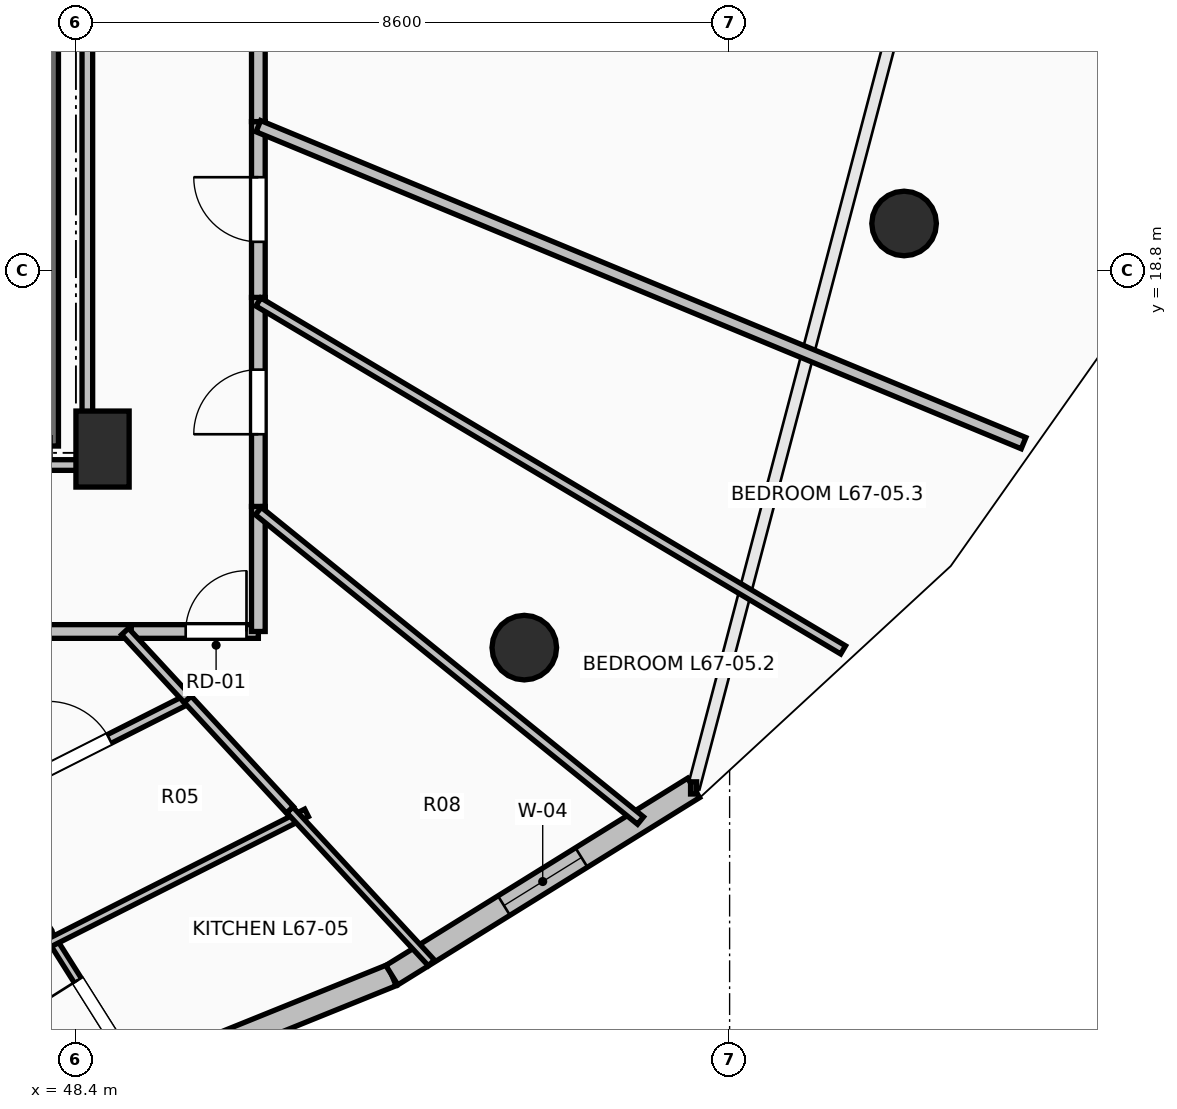
"""IFC4 building model, lengths in metres.
Left out: names, types, materials, properties, quantities, classifications, styles, units other than length and angle.
Written with IfcOpenShell. Run it as: python <this file> out.ifc"""

import sys

from ifc_helpers import new_model, si_unit, direction, frame, frame_2d, origin, origin_2d, place, context, subcontext, project, spatial, rectangle, circle, extrude, element, fill, save


model = new_model("IFC4")
c1 = context("Model", 3, precision=1e-05, world=origin(), true_north=direction((0.0, 1.0)))
c2 = subcontext(c1, "Body", "Model", "MODEL_VIEW")
j1 = project(units=[si_unit("LENGTHUNIT", "METRE"), si_unit("PLANEANGLEUNIT", "RADIAN")], contexts=[c1])
p1 = place(None, origin())
s1 = spatial("IfcSite", under=j1, at=p1, CompositionType="ELEMENT")
p2 = place(p1, origin())
s2 = spatial("IfcBuilding", under=s1, at=p2, CompositionType="ELEMENT")
p3 = place(p2, frame((0.0, 0.0, 248.45)))
s3 = spatial("IfcBuildingStorey", under=s2, at=p3, CompositionType="ELEMENT", Elevation=248.45)
for number, where, z_axis, x_axis in (
    (1, (54.299, 13.838, 0.0), (0.0, 0.0, 1.0), (0.707, -0.707, 0.0)),
    (2, (59.295, 19.418, 0.0), (0.0, 0.0, 1.0), (0.924, -0.383, 0.0)),
):
    element("IfcColumn", number, at=place(p3, frame(where, z_axis=z_axis, x_axis=x_axis)), inside=s3, PredefinedType="COLUMN", context=c2, shape_type="SweptSolid", body=[
        extrude(circle(Radius=0.425, at=origin_2d()), origin(), (0.0, 0.0, 1.0), 3.55),
    ])
p4 = place(p3, frame((48.75, 16.45, 0.0), z_axis=(0.0, 0.0, 1.0), x_axis=(1.0, 0.0, 0.0)))
e3 = element("IfcColumn", 3, at=p4, inside=s3, PredefinedType="PILASTER", context=c2, shape_type="SweptSolid", body=[
    extrude(rectangle(XDim=0.7, YDim=1.0, at=origin_2d()), origin(), (0.0, 0.0, 1.0), 3.55),
])
p5 = place(p3, frame((48.026, 7.698, 0.0), z_axis=(0.0, 0.0, 1.0), x_axis=(0.927147375511, 0.374696869594, 0.0)))
e4 = element("IfcWall", 4, at=p5, inside=s3, PredefinedType="STANDARD", context=c2, shape_type="SweptSolid", body=[
    extrude(rectangle(XDim=4.885, YDim=0.3, at=frame_2d((2.443, 0.0))), origin(), (0.0, 0.0, 1.0), 3.29),
])
p6 = place(p3, frame((52.556, 9.529, 0.0), z_axis=(0.0, 0.0, 1.0), x_axis=(0.849702323036, 0.527262707032, 0.0)))
e5 = element("IfcWall", 5, at=p6, inside=s3, PredefinedType="STANDARD", context=c2, shape_type="SweptSolid", body=[
    extrude(rectangle(XDim=4.672, YDim=0.3, at=frame_2d((2.336, 0.0))), origin(), (0.0, 0.0, 1.0), 3.29),
])
p7 = place(p6, frame((1.736, 0.0, 0.85)))
e6 = element("IfcOpeningElement", 6, at=p7, cuts=e5, PredefinedType="OPENING", context=c2, shape_type="SweptSolid", body=[
    extrude(rectangle(XDim=1.2, YDim=1.95, at=frame_2d((0.6, 0.975))), frame((0.0, 0.165, 0.0), z_axis=(0.0, -1.0, 0.0), x_axis=(1.0, 0.0, 0.0)), (0.0, 0.0, 1.0), 0.33),
])
p8 = place(p3, frame((48.06, 23.91, 0.0), z_axis=(0.0, 0.0, 1.0), x_axis=(0.0, -1.0, 0.0)))
e7 = element("IfcWall", 7, at=p8, inside=s3, PredefinedType="SOLIDWALL", context=c2, shape_type="SweptSolid", body=[
    extrude(rectangle(XDim=7.42, YDim=0.22, at=frame_2d((3.71, 0.0))), origin(), (0.0, 0.0, 1.0), 3.29),
])
p9 = place(p3, frame((45.237, 14.05, 0.0), z_axis=(0.0, 0.0, 1.0), x_axis=(1.0, 0.0, 0.0)))
e8 = element("IfcWall", 8, at=p9, inside=s3, PredefinedType="PARTITIONING", context=c2, shape_type="SweptSolid", body=[
    extrude(rectangle(XDim=3.891, YDim=0.18, at=frame_2d((1.945, 0.0))), origin(), (0.0, 0.0, 1.0), 2.482),
])
p10 = place(p9, frame((1.446, 0.0, 0.0)))
e9 = element("IfcOpeningElement", 9, at=p10, cuts=e8, PredefinedType="OPENING", context=c2, shape_type="SweptSolid", body=[
    extrude(rectangle(XDim=1.0, YDim=2.15, at=frame_2d((0.5, 1.075))), frame((0.0, 0.105, 0.0), z_axis=(0.0, -1.0, 0.0), x_axis=(1.0, 0.0, 0.0)), (0.0, 0.0, 1.0), 0.21),
])
p11 = place(p3, frame((49.128, 14.05, 0.0), z_axis=(0.0, 0.0, 1.0), x_axis=(1.0, 0.0, 0.0)))
e10 = element("IfcWall", 10, at=p11, inside=s3, PredefinedType="PARTITIONING", context=c2, shape_type="SweptSolid", body=[
    extrude(rectangle(XDim=1.672, YDim=0.18, at=frame_2d((0.836, 0.0))), origin(), (0.0, 0.0, 1.0), 2.972),
])
p12 = place(p11, frame((0.716, 0.0, 0.0)))
e11 = element("IfcOpeningElement", 11, at=p12, cuts=e10, PredefinedType="OPENING", context=c2, shape_type="SweptSolid", body=[
    extrude(rectangle(XDim=0.8, YDim=2.05, at=frame_2d((0.4, 1.025))), frame((0.0, 0.105, 0.0), z_axis=(0.0, -1.0, 0.0), x_axis=(1.0, 0.0, 0.0)), (0.0, 0.0, 1.0), 0.21),
])
p13 = place(p3, frame((50.8, 14.05, 0.0), z_axis=(0.0, 0.0, 1.0), x_axis=(0.0, 1.0, 0.0)))
e12 = element("IfcWall", 12, at=p13, inside=s3, PredefinedType="PARTITIONING", context=c2, shape_type="SweptSolid", body=[
    extrude(rectangle(XDim=1.645, YDim=0.18, at=frame_2d((0.823, 0.0))), origin(), (0.0, 0.0, 1.0), 2.482),
])
p14 = place(p3, frame((50.8, 15.695, 0.0), z_axis=(0.0, 0.0, 1.0), x_axis=(0.0, 1.0, 0.0)))
e13 = element("IfcWall", 13, at=p14, inside=s3, PredefinedType="PARTITIONING", context=c2, shape_type="SweptSolid", body=[
    extrude(rectangle(XDim=2.75, YDim=0.18, at=frame_2d((1.375, 0.0))), origin(), (0.0, 0.0, 1.0), 2.482),
])
p15 = place(p14, frame((0.95, 0.0, 0.0)))
e14 = element("IfcOpeningElement", 14, at=p15, cuts=e13, PredefinedType="OPENING", context=c2, shape_type="SweptSolid", body=[
    extrude(rectangle(XDim=0.85, YDim=2.1, at=frame_2d((0.425, 1.05))), frame((0.0, 0.105, 0.0), z_axis=(0.0, -1.0, 0.0), x_axis=(1.0, 0.0, 0.0)), (0.0, 0.0, 1.0), 0.21),
])
p16 = place(p3, frame((50.8, 18.445, 0.0), z_axis=(0.0, 0.0, 1.0), x_axis=(0.0, 1.0, 0.0)))
e15 = element("IfcWall", 15, at=p16, inside=s3, PredefinedType="PARTITIONING", context=c2, shape_type="SweptSolid", body=[
    extrude(rectangle(XDim=2.313, YDim=0.18, at=frame_2d((1.156, 0.0))), origin(), (0.0, 0.0, 1.0), 3.022),
])
p17 = place(p16, frame((0.731, 0.0, 0.0)))
e16 = element("IfcOpeningElement", 16, at=p17, cuts=e15, PredefinedType="OPENING", context=c2, shape_type="SweptSolid", body=[
    extrude(rectangle(XDim=0.85, YDim=2.1, at=frame_2d((0.425, 1.05))), frame((0.0, 0.105, 0.0), z_axis=(0.0, -1.0, 0.0), x_axis=(1.0, 0.0, 0.0)), (0.0, 0.0, 1.0), 0.21),
])
p18 = place(p3, frame((50.8, 20.758, 0.0), z_axis=(0.0, 0.0, 1.0), x_axis=(0.0, 1.0, 0.0)))
e17 = element("IfcWall", 17, at=p18, inside=s3, PredefinedType="PARTITIONING", context=c2, shape_type="SweptSolid", body=[
    extrude(rectangle(XDim=10.609, YDim=0.18, at=frame_2d((5.304, 0.0))), origin(), (0.0, 0.0, 1.0), 2.482),
])
p19 = place(p18, frame((4.804, 0.0, 0.0)))
e18 = element("IfcOpeningElement", 18, at=p19, cuts=e17, PredefinedType="OPENING", context=c2, shape_type="SweptSolid", body=[
    extrude(rectangle(XDim=1.0, YDim=2.15, at=frame_2d((0.5, 1.075))), frame((0.0, 0.105, 0.0), z_axis=(0.0, -1.0, 0.0), x_axis=(1.0, 0.0, 0.0)), (0.0, 0.0, 1.0), 0.21),
])
p20 = place(p3, frame((49.303, 8.067, 0.0), z_axis=(0.0, 0.0, 1.0), x_axis=(-0.53356042882, 0.845761945702, 0.0)))
e19 = element("IfcWall", 19, at=p20, inside=s3, PredefinedType="PARTITIONING", context=c2, shape_type="SweptSolid", body=[
    extrude(rectangle(XDim=2.4, YDim=0.11, at=frame_2d((1.2, 0.0))), origin(), (0.0, 0.0, 1.0), 3.29),
])
p21 = place(p20, frame((0.75, 0.0, 0.0)))
e20 = element("IfcOpeningElement", 20, at=p21, cuts=e19, PredefinedType="OPENING", context=c2, shape_type="SweptSolid", body=[
    extrude(rectangle(XDim=0.9, YDim=2.1, at=frame_2d((0.45, 1.05))), frame((0.0, 0.07, 0.0), z_axis=(0.0, -1.0, 0.0), x_axis=(1.0, 0.0, 0.0)), (0.0, 0.0, 1.0), 0.14),
])
p22 = place(p3, frame((47.006, 11.71, 0.0), z_axis=(0.0, 0.0, 1.0), x_axis=(0.892487089344, 0.451072937955, 0.0)))
e21 = element("IfcWall", 21, at=p22, inside=s3, PredefinedType="PARTITIONING", context=c2, shape_type="SweptSolid", body=[
    extrude(rectangle(XDim=3.21, YDim=0.125, at=frame_2d((1.605, 0.0))), origin(), (0.0, 0.0, 1.0), 2.482),
])
p23 = place(p22, frame((1.155, 0.0, 0.0)))
e22 = element("IfcOpeningElement", 22, at=p23, cuts=e21, PredefinedType="OPENING", context=c2, shape_type="SweptSolid", body=[
    extrude(rectangle(XDim=0.9, YDim=2.1, at=frame_2d((0.45, 1.05))), frame((0.0, 0.077, 0.0), z_axis=(0.0, -1.0, 0.0), x_axis=(1.0, 0.0, 0.0)), (0.0, 0.0, 1.0), 0.155),
])
p24 = place(p3, frame((49.871, 13.158, 0.0), z_axis=(0.0, 0.0, 1.0), x_axis=(-0.679047394912, 0.734094432251, 0.0)))
e23 = element("IfcWall", 23, at=p24, inside=s3, PredefinedType="PARTITIONING", context=c2, shape_type="SweptSolid", body=[
    extrude(rectangle(XDim=1.215, YDim=0.125, at=frame_2d((0.608, 0.0))), origin(), (0.0, 0.0, 1.0), 2.972),
])
p25 = place(p3, frame((51.434, 11.664, 0.0), z_axis=(0.0, 0.0, 1.0), x_axis=(-0.892543730476, -0.450960851059, 0.0)))
e24 = element("IfcWall", 24, at=p25, inside=s3, PredefinedType="PARTITIONING", context=c2, shape_type="SweptSolid", body=[
    extrude(rectangle(XDim=3.879, YDim=0.11, at=frame_2d((1.939, 0.0))), origin(), (0.0, 0.0, 1.0), 3.29),
])
p26 = place(p3, frame((53.076, 9.69, 0.0), z_axis=(0.0, 0.0, 1.0), x_axis=(-0.678974823397, 0.734161555241, 0.0)))
e25 = element("IfcWall", 25, at=p26, inside=s3, PredefinedType="PARTITIONING", context=c2, shape_type="SweptSolid", body=[
    extrude(rectangle(XDim=2.743, YDim=0.11, at=frame_2d((1.372, 0.0))), origin(), (0.0, 0.0, 1.0), 3.29),
])
p27 = place(p3, frame((51.215, 11.704, 0.0), z_axis=(0.0, 0.0, 1.0), x_axis=(-0.678746140468, 0.734372982073, 0.0)))
e26 = element("IfcWall", 26, at=p27, inside=s3, PredefinedType="PARTITIONING", context=c2, shape_type="SweptSolid", body=[
    extrude(rectangle(XDim=1.979, YDim=0.125, at=frame_2d((0.99, 0.0))), origin(), (0.0, 0.0, 1.0), 2.874),
])
p28 = place(p3, frame((55.828, 11.563, 0.0), z_axis=(0.0, 0.0, 1.0), x_axis=(-0.777103372697, 0.62937298015, 0.0)))
e27 = element("IfcWall", 27, at=p28, inside=s3, PredefinedType="PARTITIONING", context=c2, shape_type="SweptSolid", body=[
    extrude(rectangle(XDim=6.47, YDim=0.125, at=frame_2d((3.235, 0.0))), origin(), (0.0, 0.0, 1.0), 2.482),
])
p29 = place(p3, frame((58.493, 13.808, 0.0), z_axis=(0.0, 0.0, 1.0), x_axis=(-0.859400180079, 0.511303560011, 0.0)))
e28 = element("IfcWall", 28, at=p29, inside=s3, PredefinedType="PARTITIONING", context=c2, shape_type="SweptSolid", body=[
    extrude(rectangle(XDim=8.951, YDim=0.125, at=frame_2d((4.476, 0.0))), origin(), (0.0, 0.0, 1.0), 2.874),
])
p30 = place(p3, frame((60.867, 16.528, 0.0), z_axis=(0.0, 0.0, 1.0), x_axis=(-0.923877013663, 0.382689513347, 0.0)))
e29 = element("IfcWall", 29, at=p30, inside=s3, PredefinedType="PARTITIONING", context=c2, shape_type="SweptSolid", body=[
    extrude(rectangle(XDim=10.896, YDim=0.16, at=frame_2d((5.448, 0.0))), origin(), (0.0, 0.0, 1.0), 2.874),
])
p31 = place(p3, frame((44.805, 16.24, 0.0), z_axis=(0.0, 0.0, 1.0), x_axis=(1.0, 0.0, 0.0)))
e30 = element("IfcWall", 30, at=p31, inside=s3, PredefinedType="PARTITIONING", context=c2, shape_type="SweptSolid", body=[
    extrude(rectangle(XDim=3.745, YDim=0.14, at=frame_2d((1.873, 0.0))), origin(), (0.0, 0.0, 1.0), 2.482),
])
p32 = place(p3, frame((48.55, 16.24, 0.0), z_axis=(0.0, 0.0, 1.0), x_axis=(0.0, 1.0, 0.0)))
e31 = element("IfcWall", 31, at=p32, inside=s3, PredefinedType="PARTITIONING", context=c2, shape_type="SweptSolid", body=[
    extrude(rectangle(XDim=7.514, YDim=0.14, at=frame_2d((3.757, 0.0))), origin(), (0.0, 0.0, 1.0), 2.482),
])
p33 = place(p7, origin())
e32 = element("IfcWindow", 32, at=p33, inside=s3, PartitioningType="SINGLE_PANEL", PredefinedType="WINDOW", context=c2, shape_type="SweptSolid", body=[
    extrude(rectangle(XDim=1.2, YDim=1.95, at=frame_2d((0.6, 0.975))), frame((0.0, 0.03, 0.0), z_axis=(0.0, -1.0, 0.0), x_axis=(1.0, 0.0, 0.0)), (0.0, 0.0, 1.0), 0.06),
])
fill(e6, e32)
p34 = place(p21, origin())
e33 = element("IfcDoor", 33, at=p34, inside=s3, OperationType="SINGLE_SWING_RIGHT", PredefinedType="DOOR", context=c2, shape_type="SweptSolid", body=[
    extrude(rectangle(XDim=0.9, YDim=2.1, at=frame_2d((0.45, 1.05))), frame((0.0, 0.025, 0.0), z_axis=(0.0, -1.0, 0.0), x_axis=(1.0, 0.0, 0.0)), (0.0, 0.0, 1.0), 0.05),
])
fill(e20, e33)
p35 = place(p23, origin())
e34 = element("IfcDoor", 34, at=p35, inside=s3, OperationType="SINGLE_SWING_LEFT", PredefinedType="DOOR", context=c2, shape_type="SweptSolid", body=[
    extrude(rectangle(XDim=0.9, YDim=2.1, at=frame_2d((0.45, 1.05))), frame((0.0, 0.025, 0.0), z_axis=(0.0, -1.0, 0.0), x_axis=(1.0, 0.0, 0.0)), (0.0, 0.0, 1.0), 0.05),
])
fill(e22, e34)
p36 = place(p12, origin())
e35 = element("IfcDoor", 35, at=p36, inside=s3, OperationType="SINGLE_SWING_RIGHT", PredefinedType="DOOR", context=c2, shape_type="SweptSolid", body=[
    extrude(rectangle(XDim=0.8, YDim=2.05, at=frame_2d((0.4, 1.025))), frame((0.0, 0.025, 0.0), z_axis=(0.0, -1.0, 0.0), x_axis=(1.0, 0.0, 0.0)), (0.0, 0.0, 1.0), 0.05),
])
fill(e11, e35)
p37 = place(p15, origin())
e36 = element("IfcDoor", 36, at=p37, inside=s3, OperationType="SINGLE_SWING_LEFT", PredefinedType="DOOR", context=c2, shape_type="SweptSolid", body=[
    extrude(rectangle(XDim=0.85, YDim=2.1, at=frame_2d((0.425, 1.05))), frame((0.0, 0.025, 0.0), z_axis=(0.0, -1.0, 0.0), x_axis=(1.0, 0.0, 0.0)), (0.0, 0.0, 1.0), 0.05),
])
fill(e14, e36)
p38 = place(p17, origin())
e37 = element("IfcDoor", 37, at=p38, inside=s3, OperationType="SINGLE_SWING_RIGHT", PredefinedType="DOOR", context=c2, shape_type="SweptSolid", body=[
    extrude(rectangle(XDim=0.85, YDim=2.1, at=frame_2d((0.425, 1.05))), frame((0.0, 0.025, 0.0), z_axis=(0.0, -1.0, 0.0), x_axis=(1.0, 0.0, 0.0)), (0.0, 0.0, 1.0), 0.05),
])
fill(e16, e37)
save(model, sys.argv[1])
